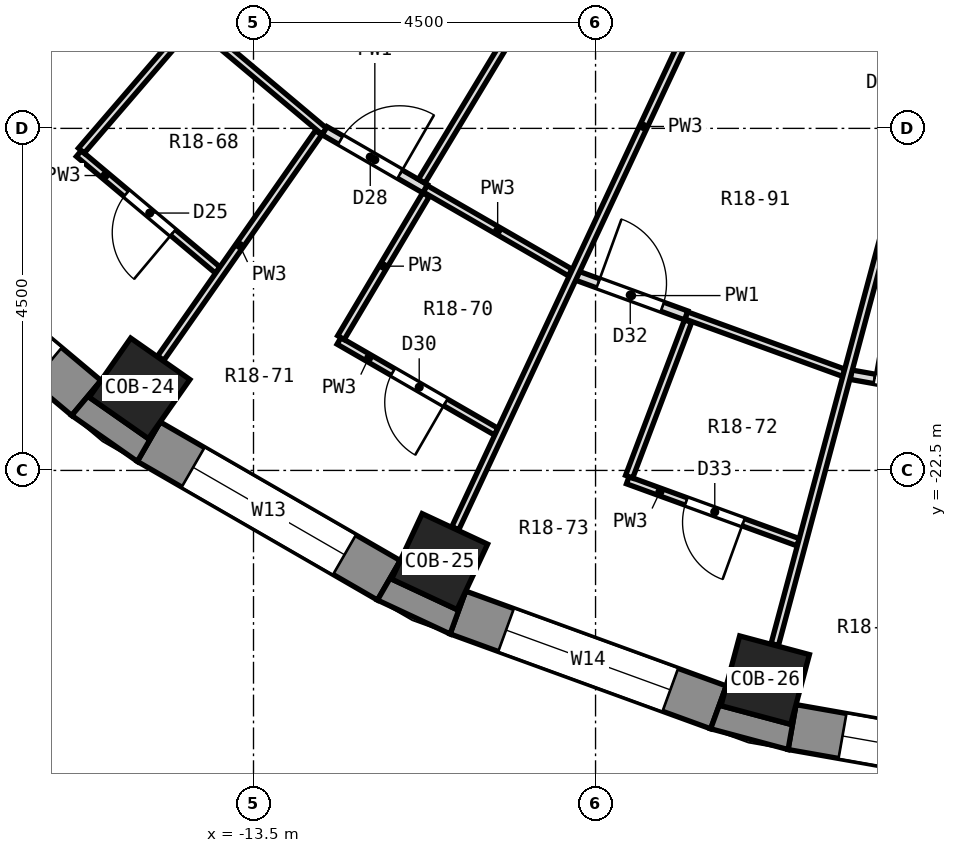
"""IFC4 building model, lengths in metres.
Left out: names, types, materials, properties, quantities, classifications, styles, units other than length and angle.
Written with IfcOpenShell. Run it as: python <this file> out.ifc"""

import sys

from ifc_helpers import new_model, si_unit, direction, frame, frame_2d, origin, origin_2d, place, context, subcontext, project, spatial, polyline, rectangle, outline, extrude, element, fill, save


model = new_model("IFC4")
c1 = context("Model", 3, precision=1e-05, world=origin(), true_north=direction((0.0, 1.0)))
c2 = subcontext(c1, "Body", "Model", "MODEL_VIEW")
j1 = project(units=[si_unit("LENGTHUNIT", "METRE"), si_unit("PLANEANGLEUNIT", "RADIAN")], contexts=[c1])
p1 = place(None, origin())
s1 = spatial("IfcSite", under=j1, at=p1, CompositionType="ELEMENT")
p2 = place(p1, origin())
s2 = spatial("IfcBuilding", under=s1, at=p2, CompositionType="ELEMENT")
p3 = place(p2, frame((0.0, 0.0, 101.8)))
s3 = spatial("IfcBuildingStorey", under=s2, at=p3, CompositionType="ELEMENT", Elevation=101.8)
for number, where, z_axis, x_axis in (
    (1, (-14.999, -21.421, 0.0), (0.0, 0.0, 1.0), (-0.574, -0.819, 0.0)),
    (2, (-11.052, -23.7, 0.0), (0.0, 0.0, 1.0), (-0.423, -0.906, 0.0)),
    (3, (-6.768, -25.259, 0.0), (0.0, 0.0, 1.0), (-0.259, -0.966, 0.0)),
):
    element("IfcColumn", number, at=place(p3, frame(where, z_axis=z_axis, x_axis=x_axis)), inside=s3, PredefinedType="COLUMN", context=c2, shape_type="SweptSolid", body=[
        extrude(rectangle(XDim=0.95, YDim=0.95, at=origin_2d()), origin(), (0.0, 0.0, 1.0), 3.3),
    ])
p4 = place(p3, frame((-18.494, -19.202, 0.0), z_axis=(0.0, 0.0, 1.0), x_axis=(0.766055462616, -0.642774476932, 0.0)))
e4 = element("IfcWall", 4, at=p4, inside=s3, PredefinedType="SOLIDWALL", context=c2, shape_type="SweptSolid", body=[
    extrude(rectangle(XDim=3.648, YDim=0.6, at=frame_2d((1.824, 0.0))), origin(), (0.0, 0.0, 1.0), 2.8),
])
p5 = place(p4, frame((0.674, 0.0, 0.9)))
e5 = element("IfcOpeningElement", 5, at=p5, cuts=e4, PredefinedType="OPENING", context=c2, shape_type="SweptSolid", body=[
    extrude(rectangle(XDim=2.3, YDim=1.8, at=frame_2d((1.15, 0.9))), frame((0.0, 0.312, 0.0), z_axis=(0.0, -1.0, 0.0), x_axis=(1.0, 0.0, 0.0)), (0.0, 0.0, 1.0), 0.624),
])
p6 = place(p3, frame((-14.878, -22.122, 0.0), z_axis=(0.0, 0.0, 1.0), x_axis=(0.866051847062, -0.499954196102, 0.0)))
e6 = element("IfcWall", 6, at=p6, inside=s3, PredefinedType="SOLIDWALL", context=c2, shape_type="SweptSolid", body=[
    extrude(rectangle(XDim=3.648, YDim=0.6, at=frame_2d((1.824, 0.0))), origin(), (0.0, 0.0, 1.0), 2.8),
])
p7 = place(p6, frame((0.674, 0.0, 0.9)))
e7 = element("IfcOpeningElement", 7, at=p7, cuts=e6, PredefinedType="OPENING", context=c2, shape_type="SweptSolid", body=[
    extrude(rectangle(XDim=2.3, YDim=1.8, at=frame_2d((1.15, 0.9))), frame((0.0, 0.312, 0.0), z_axis=(0.0, -1.0, 0.0), x_axis=(1.0, 0.0, 0.0)), (0.0, 0.0, 1.0), 0.624),
])
p8 = place(p3, frame((-10.811, -24.369, 0.0), z_axis=(0.0, 0.0, 1.0), x_axis=(0.939703505393, -0.341990236633, 0.0)))
e8 = element("IfcWall", 8, at=p8, inside=s3, PredefinedType="SOLIDWALL", context=c2, shape_type="SweptSolid", body=[
    extrude(rectangle(XDim=3.648, YDim=0.6, at=frame_2d((1.824, 0.0))), origin(), (0.0, 0.0, 1.0), 2.8),
])
p9 = place(p8, frame((0.674, 0.0, 0.9)))
e9 = element("IfcOpeningElement", 9, at=p9, cuts=e8, PredefinedType="OPENING", context=c2, shape_type="SweptSolid", body=[
    extrude(rectangle(XDim=2.3, YDim=1.8, at=frame_2d((1.15, 0.9))), frame((0.0, 0.312, 0.0), z_axis=(0.0, -1.0, 0.0), x_axis=(1.0, 0.0, 0.0)), (0.0, 0.0, 1.0), 0.624),
])
p10 = place(p3, frame((-6.415, -25.876, 0.0), z_axis=(0.0, 0.0, 1.0), x_axis=(0.984803764455, -0.173670796382, 0.0)))
e10 = element("IfcWall", 10, at=p10, inside=s3, PredefinedType="SOLIDWALL", context=c2, shape_type="SweptSolid", body=[
    extrude(rectangle(XDim=3.648, YDim=0.6, at=frame_2d((1.824, 0.0))), origin(), (0.0, 0.0, 1.0), 2.8),
])
p11 = place(p10, frame((0.674, 0.0, 0.9)))
e11 = element("IfcOpeningElement", 11, at=p11, cuts=e10, PredefinedType="OPENING", context=c2, shape_type="SweptSolid", body=[
    extrude(rectangle(XDim=2.3, YDim=1.8, at=frame_2d((1.15, 0.9))), frame((0.0, 0.312, 0.0), z_axis=(0.0, -1.0, 0.0), x_axis=(1.0, 0.0, 0.0)), (0.0, 0.0, 1.0), 0.624),
])
p12 = place(p3, origin())
e12 = element("IfcWall", 12, at=p12, inside=s3, PredefinedType="SOLIDWALL", context=c2, shape_type="SweptSolid", body=[
    extrude(outline(polyline([(-15.028, -22.382), (-14.728, -21.862), (-14.882, -22.083), (-15.661, -21.538), (-15.506, -21.317), (-15.892, -21.777), (-15.028, -22.382)])), origin(), (0.0, 0.0, 1.0), 2.8),
])
p13 = place(p3, origin())
e13 = element("IfcWall", 13, at=p13, inside=s3, PredefinedType="SOLIDWALL", context=c2, shape_type="SweptSolid", body=[
    extrude(outline(polyline([(-10.913, -24.651), (-10.708, -24.087), (-10.822, -24.331), (-11.683, -23.93), (-11.569, -23.686), (-11.869, -24.206), (-10.913, -24.651)])), origin(), (0.0, 0.0, 1.0), 2.8),
])
p14 = place(p3, origin())
e14 = element("IfcWall", 14, at=p14, inside=s3, PredefinedType="SOLIDWALL", context=c2, shape_type="SweptSolid", body=[
    extrude(outline(polyline([(-7.486, -25.899), (-6.467, -26.172), (-6.363, -25.581), (-6.432, -25.841), (-7.35, -25.595), (-7.28, -25.335), (-7.486, -25.899)])), origin(), (0.0, 0.0, 1.0), 2.8),
])
p15 = place(p3, frame((-15.798, -18.331, 0.0), z_axis=(0.0, 0.0, 1.0), x_axis=(0.766061519328, -0.642767258504, 0.0)))
e15 = element("IfcWall", 15, at=p15, inside=s3, PredefinedType="PARTITIONING", context=c2, shape_type="SweptSolid", body=[
    extrude(rectangle(XDim=2.386, YDim=0.1, at=frame_2d((1.193, 0.0))), origin(), (0.0, 0.0, 1.0), 2.8),
])
p16 = place(p15, frame((0.818, 0.0, 0.0)))
e16 = element("IfcOpeningElement", 16, at=p16, cuts=e15, PredefinedType="OPENING", context=c2, shape_type="SweptSolid", body=[
    extrude(rectangle(XDim=0.8, YDim=2.1, at=frame_2d((0.4, 1.05))), frame((0.0, 0.062, 0.0), z_axis=(0.0, -1.0, 0.0), x_axis=(1.0, 0.0, 0.0)), (0.0, 0.0, 1.0), 0.124),
])
p17 = place(p3, frame((-14.335, -16.556, 0.0), z_axis=(0.0, 0.0, 1.0), x_axis=(0.765890459519, -0.642971075568, 0.0)))
e17 = element("IfcWall", 17, at=p17, inside=s3, PredefinedType="PARTITIONING", context=c2, shape_type="SweptSolid", body=[
    extrude(rectangle(XDim=2.306, YDim=0.1, at=frame_2d((1.153, 0.0))), origin(), (0.0, 0.0, 1.0), 2.8),
])
p18 = place(p3, frame((-12.375, -20.796, 0.0), z_axis=(0.0, 0.0, 1.0), x_axis=(0.866037365989, -0.499979280282, 0.0)))
e18 = element("IfcWall", 18, at=p18, inside=s3, PredefinedType="PARTITIONING", context=c2, shape_type="SweptSolid", body=[
    extrude(rectangle(XDim=2.386, YDim=0.1, at=frame_2d((1.193, 0.0))), origin(), (0.0, 0.0, 1.0), 2.8),
])
p19 = place(p18, frame((0.818, 0.0, 0.0)))
e19 = element("IfcOpeningElement", 19, at=p19, cuts=e18, PredefinedType="OPENING", context=c2, shape_type="SweptSolid", body=[
    extrude(rectangle(XDim=0.8, YDim=2.1, at=frame_2d((0.4, 1.05))), frame((0.0, 0.062, 0.0), z_axis=(0.0, -1.0, 0.0), x_axis=(1.0, 0.0, 0.0)), (0.0, 0.0, 1.0), 0.124),
])
p20 = place(p3, frame((-11.242, -18.794, 0.0), z_axis=(0.0, 0.0, 1.0), x_axis=(0.866039875853, -0.499974932805, 0.0)))
e20 = element("IfcWall", 20, at=p20, inside=s3, PredefinedType="PARTITIONING", context=c2, shape_type="SweptSolid", body=[
    extrude(rectangle(XDim=2.204, YDim=0.1, at=frame_2d((1.102, 0.0))), origin(), (0.0, 0.0, 1.0), 2.8),
])
p21 = place(p3, frame((-12.565, -18.031, 0.0), z_axis=(0.0, 0.0, 1.0), x_axis=(0.866198896269, -0.499699381732, 0.0)))
e21 = element("IfcWall", 21, at=p21, inside=s3, PredefinedType="PARTITIONING", context=c2, shape_type="SweptSolid", body=[
    extrude(rectangle(XDim=1.527, YDim=0.125, at=frame_2d((0.763, 0.0))), origin(), (0.0, 0.0, 1.0), 2.8),
])
p22 = place(p21, frame((0.243, 0.0, 0.0)))
e22 = element("IfcOpeningElement", 22, at=p22, cuts=e21, PredefinedType="OPENING", context=c2, shape_type="SweptSolid", body=[
    extrude(rectangle(XDim=0.9, YDim=2.1, at=frame_2d((0.45, 1.05))), frame((0.0, 0.074, 0.0), z_axis=(0.0, -1.0, 0.0), x_axis=(1.0, 0.0, 0.0)), (0.0, 0.0, 1.0), 0.149),
])
p23 = place(p3, frame((-8.576, -22.629, 0.0), z_axis=(0.0, 0.0, 1.0), x_axis=(0.939703758344, -0.341989541586, 0.0)))
e23 = element("IfcWall", 23, at=p23, inside=s3, PredefinedType="PARTITIONING", context=c2, shape_type="SweptSolid", body=[
    extrude(rectangle(XDim=2.386, YDim=0.1, at=frame_2d((1.193, 0.0))), origin(), (0.0, 0.0, 1.0), 2.8),
])
p24 = place(p23, frame((0.818, 0.0, 0.0)))
e24 = element("IfcOpeningElement", 24, at=p24, cuts=e23, PredefinedType="OPENING", context=c2, shape_type="SweptSolid", body=[
    extrude(rectangle(XDim=0.8, YDim=2.1, at=frame_2d((0.4, 1.05))), frame((0.0, 0.062, 0.0), z_axis=(0.0, -1.0, 0.0), x_axis=(1.0, 0.0, 0.0)), (0.0, 0.0, 1.0), 0.124),
])
p25 = place(p3, frame((-7.808, -20.461, 0.0), z_axis=(0.0, 0.0, 1.0), x_axis=(0.939728749343, -0.341920864613, 0.0)))
e25 = element("IfcWall", 25, at=p25, inside=s3, PredefinedType="PARTITIONING", context=c2, shape_type="SweptSolid", body=[
    extrude(rectangle(XDim=2.205, YDim=0.1, at=frame_2d((1.103, 0.0))), origin(), (0.0, 0.0, 1.0), 2.8),
])
p26 = place(p3, frame((-9.243, -19.938, 0.0), z_axis=(0.0, 0.0, 1.0), x_axis=(0.939611268692, -0.342243573711, 0.0)))
e26 = element("IfcWall", 26, at=p26, inside=s3, PredefinedType="PARTITIONING", context=c2, shape_type="SweptSolid", body=[
    extrude(rectangle(XDim=1.527, YDim=0.125, at=frame_2d((0.764, 0.0))), origin(), (0.0, 0.0, 1.0), 2.8),
])
p27 = place(p26, frame((0.294, 0.0, 0.0)))
e27 = element("IfcOpeningElement", 27, at=p27, cuts=e26, PredefinedType="OPENING", context=c2, shape_type="SweptSolid", body=[
    extrude(rectangle(XDim=0.9, YDim=2.1, at=frame_2d((0.45, 1.05))), frame((0.0, 0.074, 0.0), z_axis=(0.0, -1.0, 0.0), x_axis=(1.0, 0.0, 0.0)), (0.0, 0.0, 1.0), 0.149),
])
p28 = place(p3, frame((-5.64, -21.241, 0.0), z_axis=(0.0, 0.0, 1.0), x_axis=(0.984569921273, -0.174991628724, 0.0)))
e28 = element("IfcWall", 28, at=p28, inside=s3, PredefinedType="PARTITIONING", context=c2, shape_type="SweptSolid", body=[
    extrude(rectangle(XDim=1.639, YDim=0.125, at=frame_2d((0.82, 0.0))), origin(), (0.0, 0.0, 1.0), 2.8),
])
p29 = place(p28, frame((0.313, 0.0, 0.0)))
e29 = element("IfcOpeningElement", 29, at=p29, cuts=e28, PredefinedType="OPENING", context=c2, shape_type="SweptSolid", body=[
    extrude(rectangle(XDim=0.9, YDim=2.1, at=frame_2d((0.45, 1.05))), frame((0.0, 0.074, 0.0), z_axis=(0.0, -1.0, 0.0), x_axis=(1.0, 0.0, 0.0)), (0.0, 0.0, 1.0), 0.149),
])
p30 = place(p3, frame((-18.148, -18.148, 0.0), z_axis=(0.0, 0.0, 1.0), x_axis=(0.707106781187, 0.707106781187, 0.0)))
e30 = element("IfcWall", 30, at=p30, inside=s3, PredefinedType="PARTITIONING", context=c2, shape_type="SweptSolid", body=[
    extrude(rectangle(XDim=3.622, YDim=0.1, at=frame_2d((1.811, 0.0))), origin(), (0.0, 0.0, 1.0), 2.8),
])
p31 = place(p3, frame((-15.765, -18.293, 0.0), z_axis=(0.0, 0.0, 1.0), x_axis=(0.652471516294, 0.757813249043, 0.0)))
e31 = element("IfcWall", 31, at=p31, inside=s3, PredefinedType="PARTITIONING", context=c2, shape_type="SweptSolid", body=[
    extrude(rectangle(XDim=2.188, YDim=0.1, at=frame_2d((1.094, 0.0))), origin(), (0.0, 0.0, 1.0), 2.8),
])
p32 = place(p3, frame((-14.721, -21.024, 0.0), z_axis=(0.0, 0.0, 1.0), x_axis=(0.573521163573, 0.819190743926, 0.0)))
e32 = element("IfcWall", 32, at=p32, inside=s3, PredefinedType="PARTITIONING", context=c2, shape_type="SweptSolid", body=[
    extrude(rectangle(XDim=3.621, YDim=0.1, at=frame_2d((1.811, 0.0))), origin(), (0.0, 0.0, 1.0), 2.8),
])
p33 = place(p3, frame((-11.287, -18.695, 0.0), z_axis=(0.0, 0.0, 1.0), x_axis=(0.516964841348, 0.856006631288, 0.0)))
e33 = element("IfcWall", 33, at=p33, inside=s3, PredefinedType="PARTITIONING", context=c2, shape_type="SweptSolid", body=[
    extrude(rectangle(XDim=5.782, YDim=0.1, at=frame_2d((2.891, 0.0))), origin(), (0.0, 0.0, 1.0), 2.8),
])
p34 = place(p33, frame((2.035, 0.0, 0.0)))
e34 = element("IfcOpeningElement", 34, at=p34, cuts=e33, PredefinedType="OPENING", context=c2, shape_type="SweptSolid", body=[
    extrude(rectangle(XDim=0.9, YDim=2.1, at=frame_2d((0.45, 1.05))), frame((0.0, 0.062, 0.0), z_axis=(0.0, -1.0, 0.0), x_axis=(1.0, 0.0, 0.0)), (0.0, 0.0, 1.0), 0.124),
])
p35 = place(p3, frame((-12.349, -20.753, 0.0), z_axis=(0.0, 0.0, 1.0), x_axis=(0.511242513148, 0.859436497218, 0.0)))
e35 = element("IfcWall", 35, at=p35, inside=s3, PredefinedType="PARTITIONING", context=c2, shape_type="SweptSolid", body=[
    extrude(rectangle(XDim=2.188, YDim=0.1, at=frame_2d((1.094, 0.0))), origin(), (0.0, 0.0, 1.0), 2.8),
])
p36 = place(p3, frame((-10.845, -23.261, 0.0), z_axis=(0.0, 0.0, 1.0), x_axis=(0.424206154739, 0.905565645484, 0.0)))
e36 = element("IfcWall", 36, at=p36, inside=s3, PredefinedType="PARTITIONING", context=c2, shape_type="SweptSolid", body=[
    extrude(rectangle(XDim=11.675, YDim=0.1, at=frame_2d((5.837, 0.0))), origin(), (0.0, 0.0, 1.0), 2.8),
])
p37 = place(p36, frame((7.199, 0.0, 0.0)))
e37 = element("IfcOpeningElement", 37, at=p37, cuts=e36, PredefinedType="OPENING", context=c2, shape_type="SweptSolid", body=[
    extrude(rectangle(XDim=0.9, YDim=2.1, at=frame_2d((0.45, 1.05))), frame((0.0, 0.062, 0.0), z_axis=(0.0, -1.0, 0.0), x_axis=(1.0, 0.0, 0.0)), (0.0, 0.0, 1.0), 0.124),
])
p38 = place(p3, frame((-8.558, -22.582, 0.0), z_axis=(0.0, 0.0, 1.0), x_axis=(0.35430099241, 0.935131438236, 0.0)))
e38 = element("IfcWall", 38, at=p38, inside=s3, PredefinedType="PARTITIONING", context=c2, shape_type="SweptSolid", body=[
    extrude(rectangle(XDim=2.188, YDim=0.1, at=frame_2d((1.094, 0.0))), origin(), (0.0, 0.0, 1.0), 2.8),
])
p39 = place(p3, frame((-6.642, -24.791, 0.0), z_axis=(0.0, 0.0, 1.0), x_axis=(0.259103074619, 0.965849676049, 0.0)))
e39 = element("IfcWall", 39, at=p39, inside=s3, PredefinedType="PARTITIONING", context=c2, shape_type="SweptSolid", body=[
    extrude(rectangle(XDim=11.549, YDim=0.1, at=frame_2d((5.774, 0.0))), origin(), (0.0, 0.0, 1.0), 2.8),
])
p40 = place(p39, frame((7.199, 0.0, 0.0)))
e40 = element("IfcOpeningElement", 40, at=p40, cuts=e39, PredefinedType="OPENING", context=c2, shape_type="SweptSolid", body=[
    extrude(rectangle(XDim=0.9, YDim=2.1, at=frame_2d((0.45, 1.05))), frame((0.0, 0.062, 0.0), z_axis=(0.0, -1.0, 0.0), x_axis=(1.0, 0.0, 0.0)), (0.0, 0.0, 1.0), 0.124),
])
p41 = place(p5, origin())
e41 = element("IfcWindow", 41, at=p41, inside=s3, PartitioningType="SINGLE_PANEL", PredefinedType="WINDOW", context=c2, shape_type="SweptSolid", body=[
    extrude(rectangle(XDim=2.3, YDim=1.8, at=frame_2d((1.15, 0.9))), frame((0.0, 0.18, 0.0), z_axis=(0.0, -1.0, 0.0), x_axis=(1.0, 0.0, 0.0)), (0.0, 0.0, 1.0), 0.06),
])
fill(e5, e41)
p42 = place(p7, origin())
e42 = element("IfcWindow", 42, at=p42, inside=s3, PartitioningType="SINGLE_PANEL", PredefinedType="WINDOW", context=c2, shape_type="SweptSolid", body=[
    extrude(rectangle(XDim=2.3, YDim=1.8, at=frame_2d((1.15, 0.9))), frame((0.0, 0.18, 0.0), z_axis=(0.0, -1.0, 0.0), x_axis=(1.0, 0.0, 0.0)), (0.0, 0.0, 1.0), 0.06),
])
fill(e7, e42)
p43 = place(p9, origin())
e43 = element("IfcWindow", 43, at=p43, inside=s3, PartitioningType="SINGLE_PANEL", PredefinedType="WINDOW", context=c2, shape_type="SweptSolid", body=[
    extrude(rectangle(XDim=2.3, YDim=1.8, at=frame_2d((1.15, 0.9))), frame((0.0, 0.18, 0.0), z_axis=(0.0, -1.0, 0.0), x_axis=(1.0, 0.0, 0.0)), (0.0, 0.0, 1.0), 0.06),
])
fill(e9, e43)
p44 = place(p11, origin())
e44 = element("IfcWindow", 44, at=p44, inside=s3, PartitioningType="SINGLE_PANEL", PredefinedType="WINDOW", context=c2, shape_type="SweptSolid", body=[
    extrude(rectangle(XDim=2.3, YDim=1.8, at=frame_2d((1.15, 0.9))), frame((0.0, 0.18, 0.0), z_axis=(0.0, -1.0, 0.0), x_axis=(1.0, 0.0, 0.0)), (0.0, 0.0, 1.0), 0.06),
])
fill(e11, e44)
p45 = place(p16, frame((0.8, 0.0, 0.0), z_axis=(0.0, 0.0, 1.0), x_axis=(-1.0, 0.0, 0.0)))
e45 = element("IfcDoor", 45, at=p45, inside=s3, OperationType="SINGLE_SWING_LEFT", PredefinedType="DOOR", context=c2, shape_type="SweptSolid", body=[
    extrude(rectangle(XDim=0.8, YDim=2.1, at=frame_2d((0.4, 1.05))), frame((0.0, 0.025, 0.0), z_axis=(0.0, -1.0, 0.0), x_axis=(1.0, 0.0, 0.0)), (0.0, 0.0, 1.0), 0.05),
])
fill(e16, e45)
p46 = place(p22, origin())
e46 = element("IfcDoor", 46, at=p46, inside=s3, OperationType="SINGLE_SWING_RIGHT", PredefinedType="DOOR", context=c2, shape_type="SweptSolid", body=[
    extrude(rectangle(XDim=0.9, YDim=2.1, at=frame_2d((0.45, 1.05))), frame((0.0, 0.025, 0.0), z_axis=(0.0, -1.0, 0.0), x_axis=(1.0, 0.0, 0.0)), (0.0, 0.0, 1.0), 0.05),
])
fill(e22, e46)
p47 = place(p19, frame((0.8, 0.0, 0.0), z_axis=(0.0, 0.0, 1.0), x_axis=(-1.0, 0.0, 0.0)))
e47 = element("IfcDoor", 47, at=p47, inside=s3, OperationType="SINGLE_SWING_LEFT", PredefinedType="DOOR", context=c2, shape_type="SweptSolid", body=[
    extrude(rectangle(XDim=0.8, YDim=2.1, at=frame_2d((0.4, 1.05))), frame((0.0, 0.025, 0.0), z_axis=(0.0, -1.0, 0.0), x_axis=(1.0, 0.0, 0.0)), (0.0, 0.0, 1.0), 0.05),
])
fill(e19, e47)
p48 = place(p27, origin())
e48 = element("IfcDoor", 48, at=p48, inside=s3, OperationType="SINGLE_SWING_LEFT", PredefinedType="DOOR", context=c2, shape_type="SweptSolid", body=[
    extrude(rectangle(XDim=0.9, YDim=2.1, at=frame_2d((0.45, 1.05))), frame((0.0, 0.025, 0.0), z_axis=(0.0, -1.0, 0.0), x_axis=(1.0, 0.0, 0.0)), (0.0, 0.0, 1.0), 0.05),
])
fill(e27, e48)
p49 = place(p24, frame((0.8, 0.0, 0.0), z_axis=(0.0, 0.0, 1.0), x_axis=(-1.0, 0.0, 0.0)))
e49 = element("IfcDoor", 49, at=p49, inside=s3, OperationType="SINGLE_SWING_LEFT", PredefinedType="DOOR", context=c2, shape_type="SweptSolid", body=[
    extrude(rectangle(XDim=0.8, YDim=2.1, at=frame_2d((0.4, 1.05))), frame((0.0, 0.025, 0.0), z_axis=(0.0, -1.0, 0.0), x_axis=(1.0, 0.0, 0.0)), (0.0, 0.0, 1.0), 0.05),
])
fill(e24, e49)
p50 = place(p29, origin())
e50 = element("IfcDoor", 50, at=p50, inside=s3, OperationType="SINGLE_SWING_LEFT", PredefinedType="DOOR", context=c2, shape_type="SweptSolid", body=[
    extrude(rectangle(XDim=0.9, YDim=2.1, at=frame_2d((0.45, 1.05))), frame((0.0, 0.025, 0.0), z_axis=(0.0, -1.0, 0.0), x_axis=(1.0, 0.0, 0.0)), (0.0, 0.0, 1.0), 0.05),
])
fill(e29, e50)
save(model, sys.argv[1])
